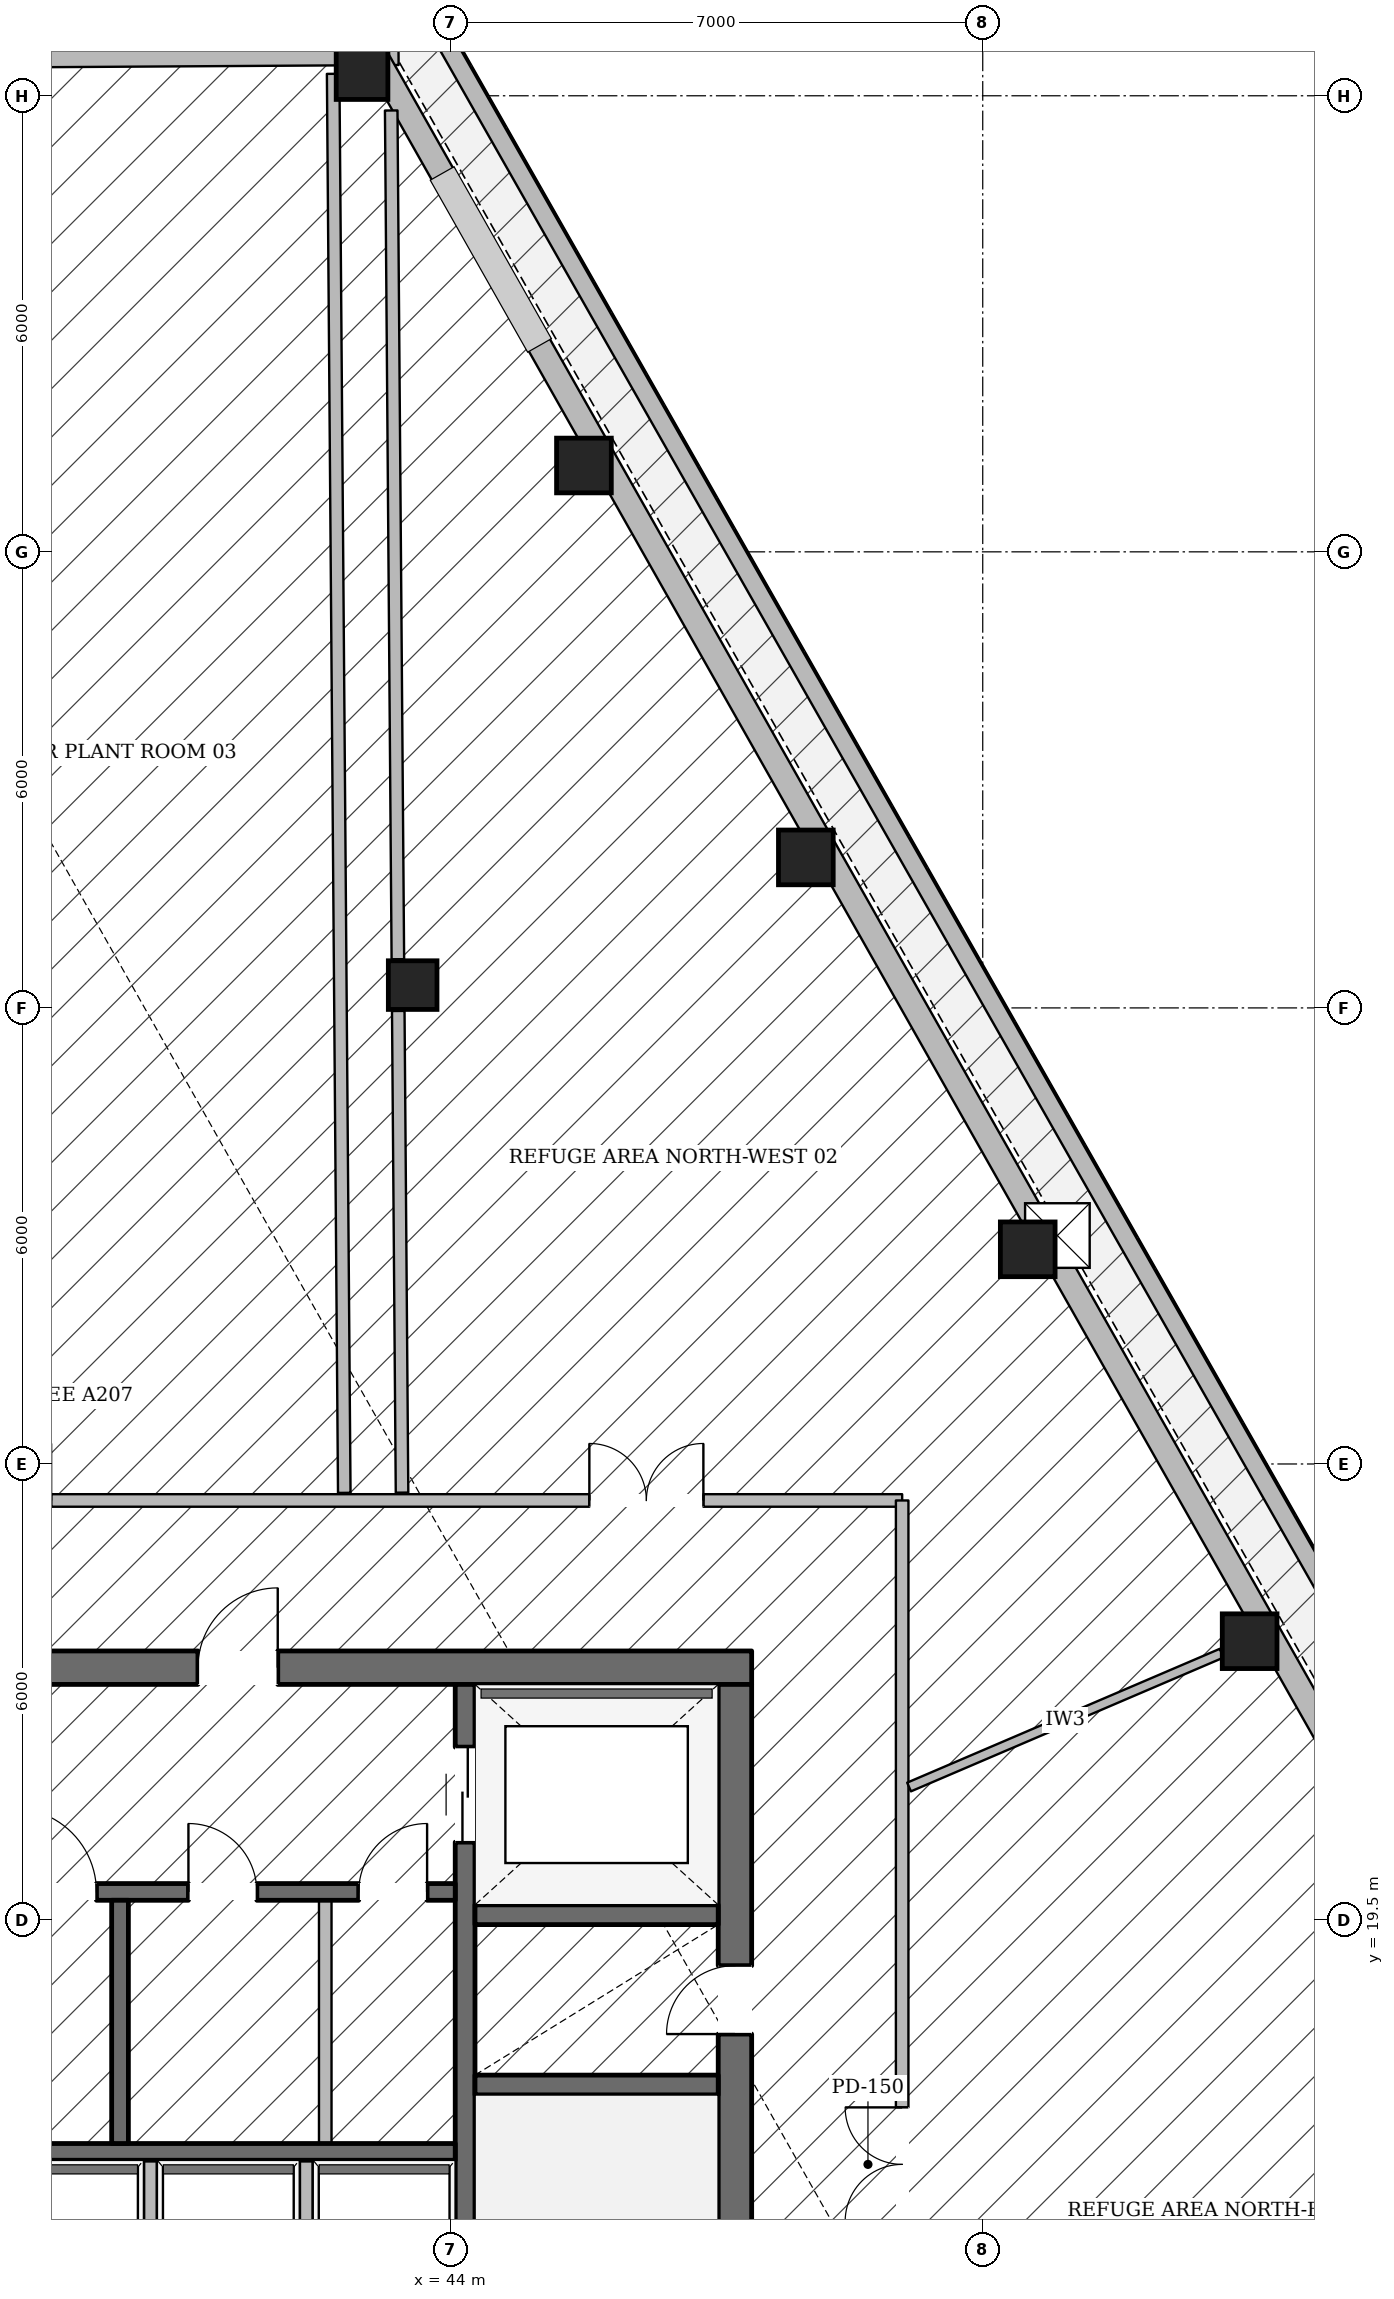
"""IFC4 building model, lengths in metres.
Left out: names, types, materials, properties, quantities, classifications, styles, units other than length and angle.
Written with IfcOpenShell. Run it as: python <this file> out.ifc"""

import sys

from ifc_helpers import new_model, si_unit, direction, frame, frame_2d, origin, origin_2d, place, context, subcontext, project, spatial, rectangle, hollow_rectangle, extrude, element, fill, save


model = new_model("IFC4")
c1 = context("Model", 3, precision=1e-05, world=origin(), true_north=direction((0.0, 1.0)))
c2 = subcontext(c1, "Body", "Model", "MODEL_VIEW")
j1 = project(units=[si_unit("LENGTHUNIT", "METRE"), si_unit("PLANEANGLEUNIT", "RADIAN")], contexts=[c1])
p1 = place(None, origin())
s1 = spatial("IfcSite", under=j1, at=p1, CompositionType="ELEMENT")
p2 = place(p1, origin())
s2 = spatial("IfcBuilding", under=s1, at=p2, CompositionType="ELEMENT")
p3 = place(p2, frame((0.0, 0.0, 154.8)))
s3 = spatial("IfcBuildingStorey", under=s2, at=p3, CompositionType="ELEMENT", Elevation=154.8)
p4 = place(p3, frame((28.04, 22.82, 0.0), z_axis=(0.0, 0.0, 1.0), x_axis=(1.0, 0.0, 0.0)))
e1 = element("IfcWall", 1, at=p4, inside=s3, PredefinedType="SOLIDWALL", context=c2, shape_type="SweptSolid", body=[
    extrude(rectangle(XDim=19.92, YDim=0.44, at=frame_2d((9.96, 0.0))), origin(), (0.0, 0.0, 1.0), 4.985),
])
p5 = place(p4, frame((6.235, 0.0, 0.0)))
e2 = element("IfcOpeningElement", 2, at=p5, cuts=e1, PredefinedType="OPENING", context=c2, shape_type="SweptSolid", body=[
    extrude(rectangle(XDim=1.05, YDim=2.15, at=frame_2d((0.525, 1.075))), frame((0.0, 0.23, 0.0), z_axis=(0.0, -1.0, 0.0), x_axis=(1.0, 0.0, 0.0)), (0.0, 0.0, 1.0), 0.46),
])
p6 = place(p4, frame((12.635, 0.0, 0.0)))
e3 = element("IfcOpeningElement", 3, at=p6, cuts=e1, PredefinedType="OPENING", context=c2, shape_type="SweptSolid", body=[
    extrude(rectangle(XDim=1.05, YDim=2.15, at=frame_2d((0.525, 1.075))), frame((0.0, 0.23, 0.0), z_axis=(0.0, -1.0, 0.0), x_axis=(1.0, 0.0, 0.0)), (0.0, 0.0, 1.0), 0.46),
])
p7 = place(p3, frame((47.74, 9.6, 0.0), z_axis=(0.0, 0.0, 1.0), x_axis=(0.0, 1.0, 0.0)))
e4 = element("IfcWall", 4, at=p7, inside=s3, PredefinedType="SOLIDWALL", context=c2, shape_type="SweptSolid", body=[
    extrude(rectangle(XDim=13.0, YDim=0.44, at=frame_2d((6.5, 0.0))), origin(), (0.0, 0.0, 1.0), 4.985),
])
p8 = place(p7, frame((0.2, 0.0, 0.0)))
e5 = element("IfcOpeningElement", 5, at=p8, cuts=e4, PredefinedType="OPENING", context=c2, shape_type="SweptSolid", body=[
    extrude(rectangle(XDim=1.1, YDim=2.15, at=frame_2d((0.55, 1.075))), frame((0.0, 0.23, 0.0), z_axis=(0.0, -1.0, 0.0), x_axis=(1.0, 0.0, 0.0)), (0.0, 0.0, 1.0), 0.46),
])
p9 = place(p7, frame((8.4, 0.0, 0.0)))
e6 = element("IfcOpeningElement", 6, at=p9, cuts=e4, PredefinedType="OPENING", context=c2, shape_type="SweptSolid", body=[
    extrude(rectangle(XDim=0.9, YDim=2.1, at=frame_2d((0.45, 1.05))), frame((0.0, 0.23, 0.0), z_axis=(0.0, -1.0, 0.0), x_axis=(1.0, 0.0, 0.0)), (0.0, 0.0, 1.0), 0.46),
])
p10 = place(p3, frame((44.19, 9.6, 0.0), z_axis=(0.0, 0.0, 1.0), x_axis=(0.0, 1.0, 0.0)))
e7 = element("IfcWall", 7, at=p10, inside=s3, PredefinedType="SHEAR", context=c2, shape_type="SweptSolid", body=[
    extrude(rectangle(XDim=13.0, YDim=0.26, at=frame_2d((6.5, 0.0))), origin(), (0.0, 0.0, 1.0), 4.985),
])
p11 = place(p10, frame((10.925, 0.0, 0.0)))
e8 = element("IfcOpeningElement", 8, at=p11, cuts=e7, PredefinedType="OPENING", context=c2, shape_type="SweptSolid", body=[
    extrude(rectangle(XDim=1.25, YDim=2.25, at=frame_2d((0.625, 1.125))), frame((0.0, 0.14, 0.0), z_axis=(0.0, -1.0, 0.0), x_axis=(1.0, 0.0, 0.0)), (0.0, 0.0, 1.0), 0.28),
])
for number, where, z_axis, x_axis in (
    (9, (44.32, 17.33, 0.0), (0.0, 0.0, 1.0), (1.0, 0.0, 0.0)),
    (10, (44.32, 19.57, 0.0), (0.0, 0.0, 1.0), (1.0, 0.0, 0.0)),
):
    element("IfcWall", number, at=place(p3, frame(where, z_axis=z_axis, x_axis=x_axis)), inside=s3, PredefinedType="SHEAR", context=c2, shape_type="SweptSolid", body=[
        extrude(rectangle(XDim=3.2, YDim=0.26, at=frame_2d((1.6, 0.0))), origin(), (0.0, 0.0, 1.0), 4.985),
    ])
p12 = place(p3, frame((31.94, 19.87, 0.0), z_axis=(0.0, 0.0, 1.0), x_axis=(1.0, 0.0, 0.0)))
e11 = element("IfcWall", 11, at=p12, inside=s3, PredefinedType="SOLIDWALL", context=c2, shape_type="SweptSolid", body=[
    extrude(rectangle(XDim=12.12, YDim=0.22, at=frame_2d((6.06, 0.0))), origin(), (0.0, 0.0, 1.0), 4.985),
])
p13 = place(p12, frame((6.3, 0.0, 0.0)))
e12 = element("IfcOpeningElement", 12, at=p13, cuts=e11, PredefinedType="OPENING", context=c2, shape_type="SweptSolid", body=[
    extrude(rectangle(XDim=1.1, YDim=2.15, at=frame_2d((0.55, 1.075))), frame((0.0, 0.12, 0.0), z_axis=(0.0, -1.0, 0.0), x_axis=(1.0, 0.0, 0.0)), (0.0, 0.0, 1.0), 0.24),
])
p14 = place(p12, frame((8.61, 0.0, 0.0)))
e13 = element("IfcOpeningElement", 13, at=p14, cuts=e11, PredefinedType="OPENING", context=c2, shape_type="SweptSolid", body=[
    extrude(rectangle(XDim=0.9, YDim=2.1, at=frame_2d((0.45, 1.05))), frame((0.0, 0.12, 0.0), z_axis=(0.0, -1.0, 0.0), x_axis=(1.0, 0.0, 0.0)), (0.0, 0.0, 1.0), 0.24),
])
p15 = place(p12, frame((10.85, 0.0, 0.0)))
e14 = element("IfcOpeningElement", 14, at=p15, cuts=e11, PredefinedType="OPENING", context=c2, shape_type="SweptSolid", body=[
    extrude(rectangle(XDim=0.9, YDim=2.1, at=frame_2d((0.45, 1.05))), frame((0.0, 0.12, 0.0), z_axis=(0.0, -1.0, 0.0), x_axis=(1.0, 0.0, 0.0)), (0.0, 0.0, 1.0), 0.24),
])
p16 = place(p3, frame((31.94, 16.45, 0.0), z_axis=(0.0, 0.0, 1.0), x_axis=(1.0, 0.0, 0.0)))
e15 = element("IfcWall", 15, at=p16, inside=s3, PredefinedType="SOLIDWALL", context=c2, shape_type="SweptSolid", body=[
    extrude(rectangle(XDim=12.12, YDim=0.22, at=frame_2d((6.06, 0.0))), origin(), (0.0, 0.0, 1.0), 4.985),
])
p17 = place(p3, frame((39.65, 16.56, 0.0), z_axis=(0.0, 0.0, 1.0), x_axis=(0.0, 1.0, 0.0)))
e16 = element("IfcWall", 16, at=p17, inside=s3, PredefinedType="SOLIDWALL", context=c2, shape_type="SweptSolid", body=[
    extrude(rectangle(XDim=3.2, YDim=0.22, at=frame_2d((1.6, 0.0))), origin(), (0.0, 0.0, 1.0), 4.985),
])
for number, where, z_axis, x_axis in (
    (17, (54.511, 23.168, 0.0), (0.0, 0.0, 1.0), (1.0, 0.0, 0.0)),
    (18, (51.592, 28.324, 0.0), (0.0, 0.0, 1.0), (1.0, 0.0, 0.0)),
    (19, (48.673, 33.48, 0.0), (0.0, 0.0, 1.0), (1.0, 0.0, 0.0)),
    (20, (45.753, 38.636, 0.0), (0.0, 0.0, 1.0), (1.0, 0.0, 0.0)),
):
    element("IfcColumn", number, at=place(p3, frame(where, z_axis=z_axis, x_axis=x_axis)), inside=s3, PredefinedType="COLUMN", context=c2, shape_type="SweptSolid", body=[
        extrude(hollow_rectangle(XDim=0.72, YDim=0.72, WallThickness=0.032, at=origin_2d()), origin(), (0.0, 0.0, 1.0), 4.985),
    ])
p18 = place(p3, frame((42.834, 43.792, 0.0), z_axis=(0.0, 0.0, 1.0), x_axis=(1.0, 0.0, 0.0)))
e21 = element("IfcColumn", 21, at=p18, inside=s3, PredefinedType="COLUMN", context=c2, shape_type="SweptSolid", body=[
    extrude(hollow_rectangle(XDim=0.68, YDim=0.68, WallThickness=0.03, at=origin_2d()), origin(), (0.0, 0.0, 1.0), 4.985),
])
p19 = place(p3, frame((43.5, 31.8, 0.0), z_axis=(0.0, 0.0, 1.0), x_axis=(1.0, 0.0, 0.0)))
e22 = element("IfcColumn", 22, at=p19, inside=s3, PredefinedType="COLUMN", context=c2, shape_type="SweptSolid", body=[
    extrude(hollow_rectangle(XDim=0.64, YDim=0.64, WallThickness=0.028, at=origin_2d()), origin(), (0.0, 0.0, 1.0), 4.985),
])
p20 = place(p3, frame((32.578, 43.999, 0.0), z_axis=(0.0, 0.0, 1.0), x_axis=(0.999981011768, 0.006162475365, 0.0)))
e23 = element("IfcWall", 23, at=p20, inside=s3, PredefinedType="STANDARD", context=c2, shape_type="SweptSolid", body=[
    extrude(rectangle(XDim=10.736, YDim=0.32, at=frame_2d((5.368, 0.0))), origin(), (0.0, 0.0, 1.0), 3.677),
])
p21 = place(p3, frame((42.832, 44.344, 0.0), z_axis=(0.0, 0.0, 1.0), x_axis=(0.492716907926, -0.870189662455, 0.0)))
e24 = element("IfcWall", 24, at=p21, inside=s3, PredefinedType="STANDARD", context=c2, shape_type="SweptSolid", body=[
    extrude(rectangle(XDim=36.505, YDim=0.32, at=frame_2d((18.253, 0.0))), origin(), (0.0, 0.0, 1.0), 3.677),
])
p22 = place(p3, frame((62.043, 12.37, 0.0), z_axis=(0.0, 0.0, 1.0), x_axis=(-0.494365638539, 0.869254056897, 0.0)))
e25 = element("IfcWall", 25, at=p22, inside=s3, PredefinedType="PARAPET", context=c2, shape_type="SweptSolid", body=[
    extrude(rectangle(XDim=37.934, YDim=0.24, at=frame_2d((18.967, 0.0))), origin(), (0.0, 0.0, 1.0), 1.25),
])
for number, where, z_axis, x_axis in (
    (26, (40.05, 14.1, 0.0), (0.0, 0.0, 1.0), (0.0, 1.0, 0.0)),
    (27, (42.1, 14.1, 0.0), (0.0, 0.0, 1.0), (0.0, 1.0, 0.0)),
):
    element("IfcWall", number, at=place(p3, frame(where, z_axis=z_axis, x_axis=x_axis)), inside=s3, PredefinedType="PARTITIONING", context=c2, shape_type="SweptSolid", body=[
        extrude(rectangle(XDim=2.24, YDim=0.165, at=frame_2d((1.12, 0.0))), origin(), (0.0, 0.0, 1.0), 4.985),
    ])
p23 = place(p3, frame((42.35, 16.56, 0.0), z_axis=(0.0, 0.0, 1.0), x_axis=(0.0, 1.0, 0.0)))
e28 = element("IfcWall", 28, at=p23, inside=s3, PredefinedType="PARTITIONING", context=c2, shape_type="SweptSolid", body=[
    extrude(rectangle(XDim=3.2, YDim=0.165, at=frame_2d((1.6, 0.0))), origin(), (0.0, 0.0, 1.0), 4.985),
])
p24 = place(p3, frame((26.06, 25.02, 0.0), z_axis=(0.0, 0.0, 1.0), x_axis=(1.0, 0.0, 0.0)))
e29 = element("IfcWall", 29, at=p24, inside=s3, PredefinedType="PARTITIONING", context=c2, shape_type="SweptSolid", body=[
    extrude(rectangle(XDim=23.88, YDim=0.165, at=frame_2d((11.94, 0.0))), origin(), (0.0, 0.0, 1.0), 4.985),
])
p25 = place(p24, frame((19.765, 0.0, 0.0)))
e30 = element("IfcOpeningElement", 30, at=p25, cuts=e29, PredefinedType="OPENING", context=c2, shape_type="SweptSolid", body=[
    extrude(rectangle(XDim=1.5, YDim=2.25, at=frame_2d((0.75, 1.125))), frame((0.0, 0.093, 0.0), z_axis=(0.0, -1.0, 0.0), x_axis=(1.0, 0.0, 0.0)), (0.0, 0.0, 1.0), 0.185),
])
p26 = place(p24, frame((11.183, 0.0, 0.0)))
e31 = element("IfcOpeningElement", 31, at=p26, cuts=e29, PredefinedType="OPENING", context=c2, shape_type="SweptSolid", body=[
    extrude(rectangle(XDim=1.5, YDim=2.25, at=frame_2d((0.75, 1.125))), frame((0.0, 0.093, 0.0), z_axis=(0.0, -1.0, 0.0), x_axis=(1.0, 0.0, 0.0)), (0.0, 0.0, 1.0), 0.185),
])
p27 = place(p3, frame((49.94, 7.18, 0.0), z_axis=(0.0, 0.0, 1.0), x_axis=(0.0, 1.0, 0.0)))
e32 = element("IfcWall", 32, at=p27, inside=s3, PredefinedType="PARTITIONING", context=c2, shape_type="SweptSolid", body=[
    extrude(rectangle(XDim=17.84, YDim=0.165, at=frame_2d((8.92, 0.0))), origin(), (0.0, 0.0, 1.0), 4.673),
])
p28 = place(p27, frame((8.355, 0.0, 0.0)))
e33 = element("IfcOpeningElement", 33, at=p28, cuts=e32, PredefinedType="OPENING", context=c2, shape_type="SweptSolid", body=[
    extrude(rectangle(XDim=1.5, YDim=2.25, at=frame_2d((0.75, 1.125))), frame((0.0, 0.093, 0.0), z_axis=(0.0, -1.0, 0.0), x_axis=(1.0, 0.0, 0.0)), (0.0, 0.0, 1.0), 0.185),
])
p29 = place(p27, frame((1.067, 0.0, 0.0)))
e34 = element("IfcOpeningElement", 34, at=p29, cuts=e32, PredefinedType="OPENING", context=c2, shape_type="SweptSolid", body=[
    extrude(rectangle(XDim=1.5, YDim=2.25, at=frame_2d((0.75, 1.125))), frame((0.0, 0.093, 0.0), z_axis=(0.0, -1.0, 0.0), x_axis=(1.0, 0.0, 0.0)), (0.0, 0.0, 1.0), 0.185),
])
p30 = place(p3, frame((42.6, 25.12, 0.0), z_axis=(0.0, 0.0, 1.0), x_axis=(-0.007833204162, 0.999969319986, 0.0)))
e35 = element("IfcWall", 35, at=p30, inside=s3, PredefinedType="PARTITIONING", context=c2, shape_type="SweptSolid", body=[
    extrude(rectangle(XDim=18.669, YDim=0.165, at=frame_2d((9.334, 0.0))), origin(), (0.0, 0.0, 1.0), 4.985),
])
p31 = place(p3, frame((43.36, 25.123, 0.0), z_axis=(0.0, 0.0, 1.0), x_axis=(-0.007820688544, 0.999969417948, 0.0)))
e36 = element("IfcWall", 36, at=p31, inside=s3, PredefinedType="PARTITIONING", context=c2, shape_type="SweptSolid", body=[
    extrude(rectangle(XDim=6.337, YDim=0.165, at=frame_2d((3.168, 0.0))), origin(), (0.0, 0.0, 1.0), 4.985),
])
p32 = place(p3, frame((43.305, 32.14, 0.0), z_axis=(0.0, 0.0, 1.0), x_axis=(-0.007848811534, 0.999969197604, 0.0)))
e37 = element("IfcWall", 37, at=p32, inside=s3, PredefinedType="PARTITIONING", context=c2, shape_type="SweptSolid", body=[
    extrude(rectangle(XDim=11.167, YDim=0.165, at=frame_2d((5.583, 0.0))), origin(), (0.0, 0.0, 1.0), 3.68),
])
p33 = place(p3, frame((50.031, 21.25, 0.0), z_axis=(0.0, 0.0, 1.0), x_axis=(0.919317125759, 0.393517499338, 0.0)))
e38 = element("IfcWall", 38, at=p33, inside=s3, PredefinedType="PARTITIONING", context=c2, shape_type="SweptSolid", body=[
    extrude(rectangle(XDim=4.474, YDim=0.125, at=frame_2d((2.237, 0.0))), origin(), (0.0, 0.0, 1.0), 3.68),
])
p34 = place(p3, frame((0.0, 0.0, -0.22)))
p35 = place(p34, frame((51.982, 28.505, 0.0)))
p36 = place(p35, frame((0.0, 0.0, 0.17)))
e39 = element("IfcWindow", 39, at=p36, inside=s3, PartitioningType="SINGLE_PANEL", PredefinedType="SKYLIGHT", context=c2, shape_type="SweptSolid", body=[
    extrude(rectangle(XDim=0.85, YDim=0.85, at=origin_2d()), origin(), (0.0, 0.0, 1.0), 0.05),
])
p37 = place(p13, origin())
e40 = element("IfcDoor", 40, at=p37, inside=s3, OperationType="SINGLE_SWING_LEFT", PredefinedType="DOOR", context=c2, shape_type="SweptSolid", body=[
    extrude(rectangle(XDim=1.1, YDim=2.15, at=frame_2d((0.55, 1.075))), frame((0.0, 0.025, 0.0), z_axis=(0.0, -1.0, 0.0), x_axis=(1.0, 0.0, 0.0)), (0.0, 0.0, 1.0), 0.05),
])
fill(e12, e40)
p38 = place(p9, origin())
e41 = element("IfcDoor", 41, at=p38, inside=s3, OperationType="SINGLE_SWING_LEFT", PredefinedType="DOOR", context=c2, shape_type="SweptSolid", body=[
    extrude(rectangle(XDim=0.9, YDim=2.1, at=frame_2d((0.45, 1.05))), frame((0.0, 0.025, 0.0), z_axis=(0.0, -1.0, 0.0), x_axis=(1.0, 0.0, 0.0)), (0.0, 0.0, 1.0), 0.05),
])
fill(e6, e41)
p39 = place(p6, origin())
e42 = element("IfcDoor", 42, at=p39, inside=s3, OperationType="SINGLE_SWING_RIGHT", PredefinedType="DOOR", context=c2, shape_type="SweptSolid", body=[
    extrude(rectangle(XDim=1.05, YDim=2.15, at=frame_2d((0.525, 1.075))), frame((0.0, 0.025, 0.0), z_axis=(0.0, -1.0, 0.0), x_axis=(1.0, 0.0, 0.0)), (0.0, 0.0, 1.0), 0.05),
])
fill(e3, e42)
p40 = place(p11, origin())
e43 = element("IfcDoor", 43, at=p40, inside=s3, OperationType="DOUBLE_DOOR_SLIDING", PredefinedType="DOOR", context=c2, shape_type="SweptSolid", body=[
    extrude(rectangle(XDim=1.25, YDim=2.25, at=frame_2d((0.625, 1.125))), frame((0.0, 0.025, 0.0), z_axis=(0.0, -1.0, 0.0), x_axis=(1.0, 0.0, 0.0)), (0.0, 0.0, 1.0), 0.05),
])
fill(e8, e43)
p41 = place(p14, origin())
e44 = element("IfcDoor", 44, at=p41, inside=s3, OperationType="SINGLE_SWING_LEFT", PredefinedType="DOOR", context=c2, shape_type="SweptSolid", body=[
    extrude(rectangle(XDim=0.9, YDim=2.1, at=frame_2d((0.45, 1.05))), frame((0.0, 0.025, 0.0), z_axis=(0.0, -1.0, 0.0), x_axis=(1.0, 0.0, 0.0)), (0.0, 0.0, 1.0), 0.05),
])
fill(e13, e44)
p42 = place(p15, origin())
e45 = element("IfcDoor", 45, at=p42, inside=s3, OperationType="SINGLE_SWING_RIGHT", PredefinedType="DOOR", context=c2, shape_type="SweptSolid", body=[
    extrude(rectangle(XDim=0.9, YDim=2.1, at=frame_2d((0.45, 1.05))), frame((0.0, 0.025, 0.0), z_axis=(0.0, -1.0, 0.0), x_axis=(1.0, 0.0, 0.0)), (0.0, 0.0, 1.0), 0.05),
])
fill(e14, e45)
p43 = place(p28, origin())
e46 = element("IfcDoor", 46, at=p43, inside=s3, OperationType="DOUBLE_DOOR_SINGLE_SWING", PredefinedType="DOOR", context=c2, shape_type="SweptSolid", body=[
    extrude(rectangle(XDim=1.5, YDim=2.25, at=frame_2d((0.75, 1.125))), frame((0.0, 0.025, 0.0), z_axis=(0.0, -1.0, 0.0), x_axis=(1.0, 0.0, 0.0)), (0.0, 0.0, 1.0), 0.05),
])
fill(e33, e46)
p44 = place(p25, origin())
e47 = element("IfcDoor", 47, at=p44, inside=s3, OperationType="DOUBLE_DOOR_SINGLE_SWING", PredefinedType="DOOR", context=c2, shape_type="SweptSolid", body=[
    extrude(rectangle(XDim=1.5, YDim=2.25, at=frame_2d((0.75, 1.125))), frame((0.0, 0.025, 0.0), z_axis=(0.0, -1.0, 0.0), x_axis=(1.0, 0.0, 0.0)), (0.0, 0.0, 1.0), 0.05),
])
fill(e30, e47)
save(model, sys.argv[1])
